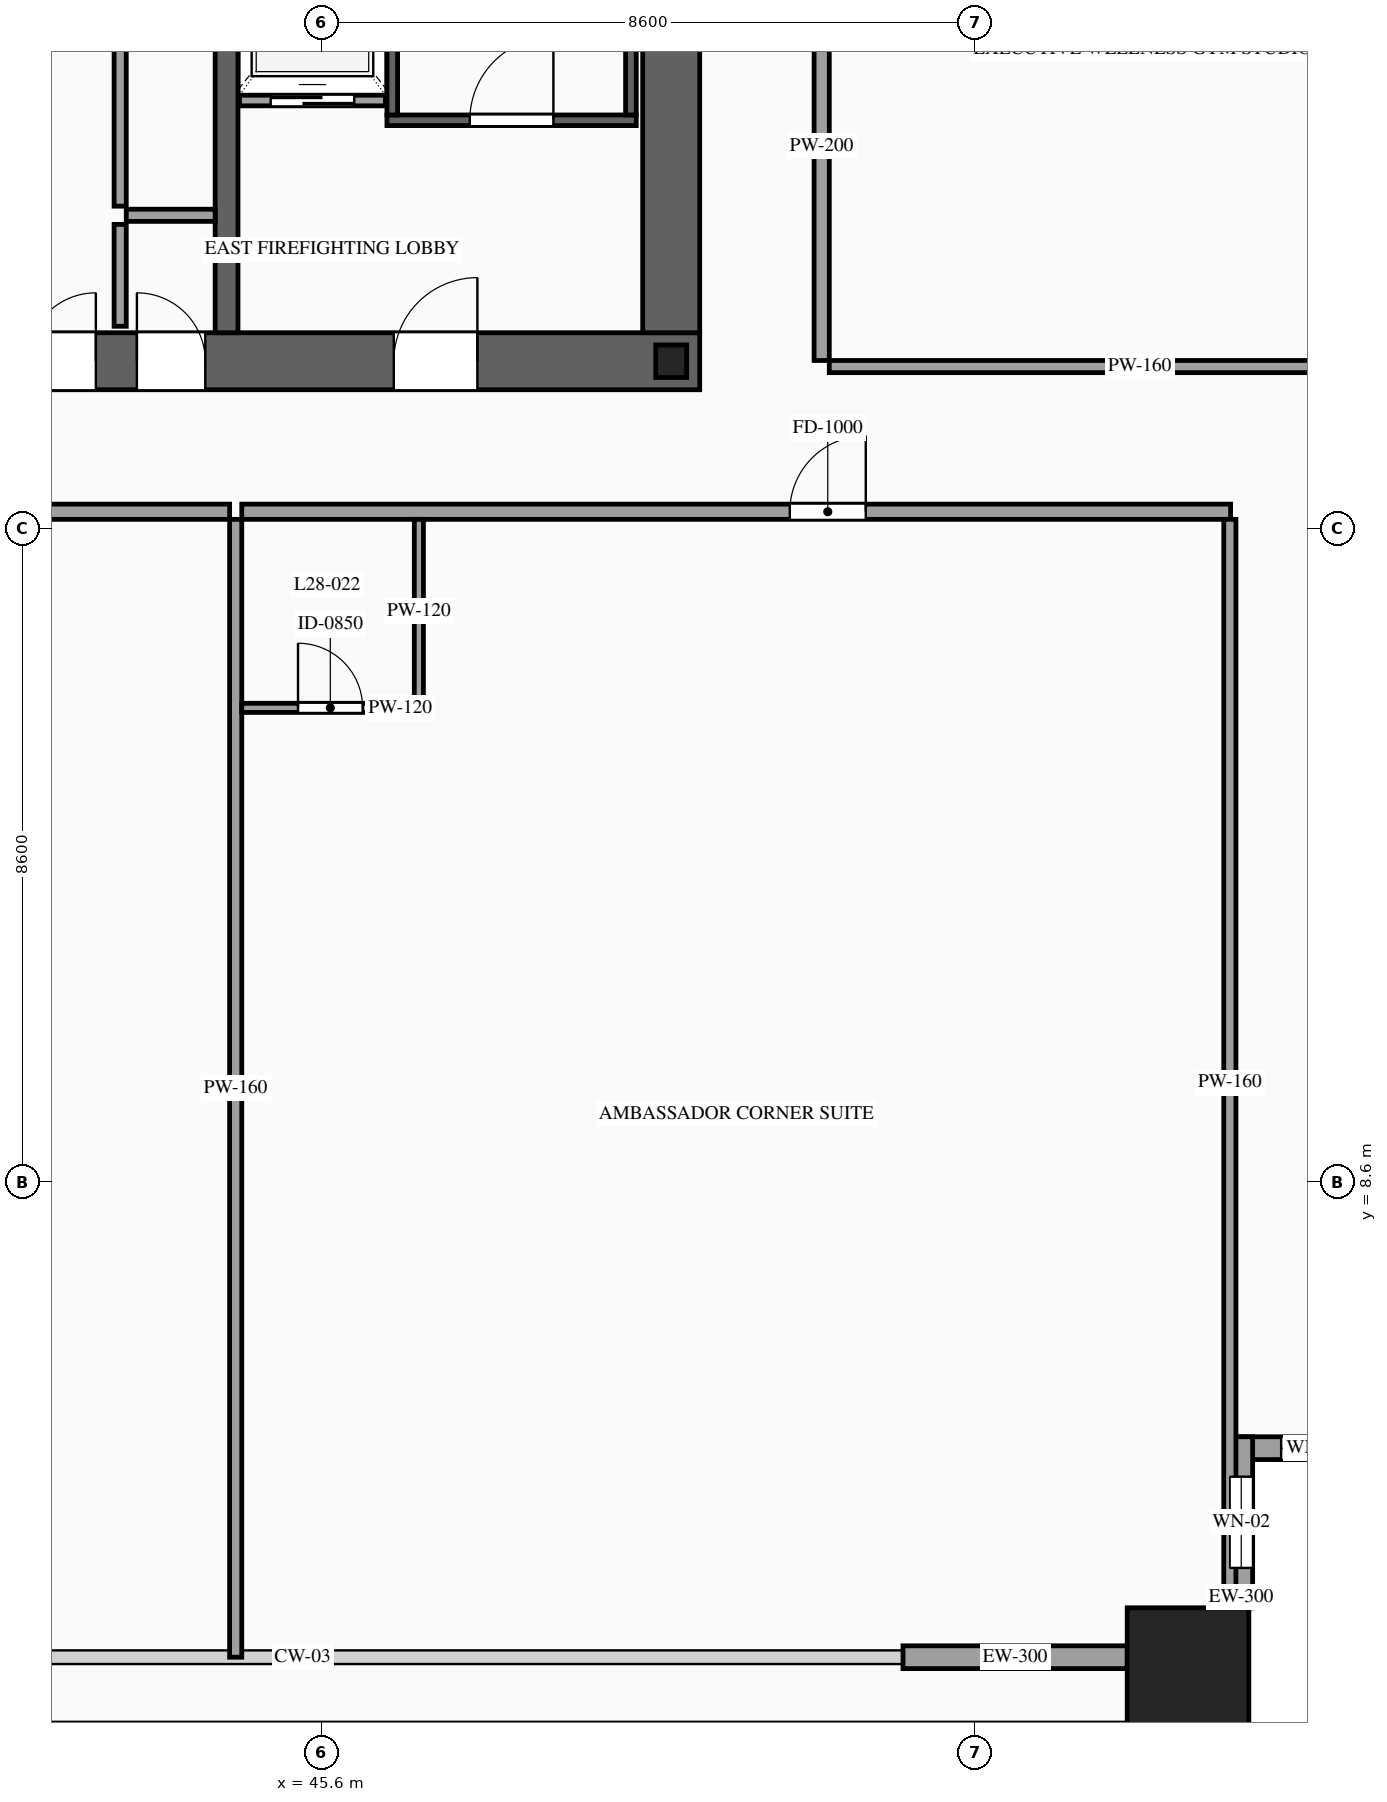
"""IFC4 building model, lengths in metres.
Left out: names, types, materials, properties, quantities, classifications, styles, units other than length and angle.
Written with IfcOpenShell. Run it as: python <this file> out.ifc"""

import sys

from ifc_helpers import new_model, si_unit, direction, frame, frame_2d, origin, origin_2d, place, context, subcontext, project, spatial, rectangle, hollow_rectangle, i_section, extrude, source, transform, mapped, element, fill, save


model = new_model("IFC4")
c1 = context("Model", 3, precision=1e-05, world=origin(), true_north=direction((0.0, 1.0)))
c2 = subcontext(c1, "Body", "Model", "MODEL_VIEW")
j1 = project(units=[si_unit("LENGTHUNIT", "METRE"), si_unit("PLANEANGLEUNIT", "RADIAN")], contexts=[c1])
p1 = place(None, origin())
s1 = spatial("IfcSite", under=j1, at=p1, CompositionType="ELEMENT")
p2 = place(p1, origin())
s2 = spatial("IfcBuilding", under=s1, at=p2, CompositionType="ELEMENT")
p3 = place(p2, frame((0.0, 0.0, 108.2)))
s3 = spatial("IfcBuildingStorey", under=s2, at=p3, CompositionType="ELEMENT", Elevation=108.2)
p4 = place(p3, frame((23.425, 19.4, 0.0), z_axis=(0.0, 0.0, 1.0), x_axis=(1.0, 0.0, 0.0)))
e1 = element("IfcWall", 1, at=p4, inside=s3, PredefinedType="SHEAR", context=c2, shape_type="SweptSolid", body=[
    extrude(rectangle(XDim=27.15, YDim=0.75, at=frame_2d((13.575, 0.0))), origin(), (0.0, 0.0, 1.0), 3.6),
])
p5 = place(p4, frame((2.025, 0.0, 0.0)))
e2 = element("IfcOpeningElement", 2, at=p5, cuts=e1, PredefinedType="OPENING", context=c2, shape_type="SweptSolid", body=[
    extrude(rectangle(XDim=1.1, YDim=2.2, at=frame_2d((0.55, 1.1))), frame((0.0, 0.39, 0.0), z_axis=(0.0, -1.0, 0.0), x_axis=(1.0, 0.0, 0.0)), (0.0, 0.0, 1.0), 0.78),
])
p6 = place(p4, frame((9.925, 0.0, 0.0)))
e3 = element("IfcOpeningElement", 3, at=p6, cuts=e1, PredefinedType="OPENING", context=c2, shape_type="SweptSolid", body=[
    extrude(rectangle(XDim=1.1, YDim=2.2, at=frame_2d((0.55, 1.1))), frame((0.0, 0.39, 0.0), z_axis=(0.0, -1.0, 0.0), x_axis=(1.0, 0.0, 0.0)), (0.0, 0.0, 1.0), 0.78),
])
p7 = place(p4, frame((23.125, 0.0, 0.0)))
e4 = element("IfcOpeningElement", 4, at=p7, cuts=e1, PredefinedType="OPENING", context=c2, shape_type="SweptSolid", body=[
    extrude(rectangle(XDim=1.1, YDim=2.2, at=frame_2d((0.55, 1.1))), frame((0.0, 0.39, 0.0), z_axis=(0.0, -1.0, 0.0), x_axis=(1.0, 0.0, 0.0)), (0.0, 0.0, 1.0), 0.78),
])
p8 = place(p4, frame((19.745, 0.0, 0.0)))
e5 = element("IfcOpeningElement", 5, at=p8, cuts=e1, PredefinedType="OPENING", context=c2, shape_type="SweptSolid", body=[
    extrude(rectangle(XDim=0.9, YDim=2.15, at=frame_2d((0.45, 1.075))), frame((0.0, 0.39, 0.0), z_axis=(0.0, -1.0, 0.0), x_axis=(1.0, 0.0, 0.0)), (0.0, 0.0, 1.0), 0.78),
])
p9 = place(p4, frame((18.305, 0.0, 0.0)))
e6 = element("IfcOpeningElement", 6, at=p9, cuts=e1, PredefinedType="OPENING", context=c2, shape_type="SweptSolid", body=[
    extrude(rectangle(XDim=0.9, YDim=2.15, at=frame_2d((0.45, 1.075))), frame((0.0, 0.39, 0.0), z_axis=(0.0, -1.0, 0.0), x_axis=(1.0, 0.0, 0.0)), (0.0, 0.0, 1.0), 0.78),
])
m1 = source(origin(), c2, "Body", "SweptSolid", [
    extrude(rectangle(XDim=12.05, YDim=0.75, at=frame_2d((6.025, 0.0))), origin(), (0.0, 0.0, 1.0), 3.6),
])
p10 = place(p3, frame((50.2, 19.775, 0.0), z_axis=(0.0, 0.0, 1.0), x_axis=(0.0, 1.0, 0.0)))
e7 = element("IfcWall", 7, at=p10, inside=s3, PredefinedType="SHEAR", context=c2, shape_type="MappedRepresentation", body=[
    mapped(m1, transform((0.0, 0.0, 0.0), scale=1.0)),
])
m2 = source(origin(), c2, "Body", "SweptSolid", [
    extrude(rectangle(XDim=12.05, YDim=0.3, at=frame_2d((6.025, 0.0))), origin(), (0.0, 0.0, 1.0), 3.6),
])
p11 = place(p3, frame((44.35, 19.775, 0.0), z_axis=(0.0, 0.0, 1.0), x_axis=(0.0, 1.0, 0.0)))
e8 = element("IfcWall", 8, at=p11, inside=s3, PredefinedType="SOLIDWALL", context=c2, shape_type="MappedRepresentation", body=[
    mapped(m2, transform((0.0, 0.0, 0.0), scale=1.0)),
])
m3 = source(origin(), c2, "Body", "SweptSolid", [
    extrude(i_section(OverallWidth=0.407, OverallDepth=0.428, WebThickness=0.02, FlangeThickness=0.035, at=origin_2d()), origin(), (0.0, 0.0, 1.0), 3.6),
])
p12 = place(p3, frame((50.2, 19.4, 0.0), z_axis=(0.0, 0.0, 1.0), x_axis=(1.0, 0.0, 0.0)))
e9 = element("IfcColumn", 9, at=p12, inside=s3, PredefinedType="COLUMN", context=c2, shape_type="MappedRepresentation", body=[
    mapped(m3, transform((0.0, 0.0, 0.0), scale=1.0)),
])
m4 = source(origin(), c2, "Body", "SweptSolid", [
    extrude(hollow_rectangle(XDim=1.6, YDim=1.6, WallThickness=0.07, at=origin_2d()), origin(), (0.0, 0.0, 1.0), 3.6),
])
p13 = place(p3, frame((57.0, 2.2, 0.0), z_axis=(0.0, 0.0, 1.0), x_axis=(1.0, 0.0, 0.0)))
e10 = element("IfcColumn", 10, at=p13, inside=s3, PredefinedType="COLUMN", context=c2, shape_type="MappedRepresentation", body=[
    mapped(m4, transform((0.0, 0.0, 0.0), scale=1.0)),
])
p14 = place(p3, frame((57.55, 5.1, 0.0), z_axis=(0.0, 0.0, 1.0), x_axis=(1.0, 0.0, 0.0)))
e11 = element("IfcWall", 11, at=p14, inside=s3, PredefinedType="SOLIDWALL", context=c2, shape_type="SweptSolid", body=[
    extrude(rectangle(XDim=2.25, YDim=0.3, at=frame_2d((1.125, 0.0))), origin(), (0.0, 0.0, 1.0), 3.38),
])
p15 = place(p14, frame((0.675, 0.0, 0.85)))
e12 = element("IfcOpeningElement", 12, at=p15, cuts=e11, PredefinedType="OPENING", context=c2, shape_type="SweptSolid", body=[
    extrude(rectangle(XDim=0.9, YDim=1.5, at=frame_2d((0.45, 0.75))), frame((0.0, 0.165, 0.0), z_axis=(0.0, -1.0, 0.0), x_axis=(1.0, 0.0, 0.0)), (0.0, 0.0, 1.0), 0.33),
])
p16 = place(p3, frame((57.7, 3.0, 0.0), z_axis=(0.0, 0.0, 1.0), x_axis=(0.0, 1.0, 0.0)))
e13 = element("IfcWall", 13, at=p16, inside=s3, PredefinedType="SOLIDWALL", context=c2, shape_type="SweptSolid", body=[
    extrude(rectangle(XDim=2.25, YDim=0.3, at=frame_2d((1.125, 0.0))), origin(), (0.0, 0.0, 1.0), 3.38),
])
p17 = place(p16, frame((0.525, 0.0, 0.85)))
e14 = element("IfcOpeningElement", 14, at=p17, cuts=e13, PredefinedType="OPENING", context=c2, shape_type="SweptSolid", body=[
    extrude(rectangle(XDim=1.2, YDim=2.1, at=frame_2d((0.6, 1.05))), frame((0.0, 0.165, 0.0), z_axis=(0.0, -1.0, 0.0), x_axis=(1.0, 0.0, 0.0)), (0.0, 0.0, 1.0), 0.33),
])
m5 = source(origin(), c2, "Body", "SweptSolid", [
    extrude(rectangle(XDim=2.95, YDim=0.3, at=frame_2d((1.475, 0.0))), origin(), (0.0, 0.0, 1.0), 2.775),
])
p18 = place(p3, frame((53.25, 2.35, 0.0), z_axis=(0.0, 0.0, 1.0), x_axis=(1.0, 0.0, 0.0)))
e15 = element("IfcWall", 15, at=p18, inside=s3, PredefinedType="SOLIDWALL", context=c2, shape_type="MappedRepresentation", body=[
    mapped(m5, transform((0.0, 0.0, 0.0), scale=1.0)),
])
p19 = place(p3, frame((44.52, 22.83, 0.0), z_axis=(0.0, 0.0, 1.0), x_axis=(1.0, 0.0, 0.0)))
e16 = element("IfcWall", 16, at=p19, inside=s3, PredefinedType="SOLIDWALL", context=c2, shape_type="SweptSolid", body=[
    extrude(rectangle(XDim=1.92, YDim=0.14, at=frame_2d((0.96, 0.0))), origin(), (0.0, 0.0, 1.0), 3.38),
])
p20 = place(p19, frame((0.41, 0.0, 0.0)))
e17 = element("IfcOpeningElement", 17, at=p20, cuts=e16, PredefinedType="OPENING", context=c2, shape_type="SweptSolid", body=[
    extrude(rectangle(XDim=1.1, YDim=2.2, at=frame_2d((0.55, 1.1))), frame((0.0, 0.085, 0.0), z_axis=(0.0, -1.0, 0.0), x_axis=(1.0, 0.0, 0.0)), (0.0, 0.0, 1.0), 0.17),
])
p21 = place(p3, frame((46.46, 22.57, 0.0), z_axis=(0.0, 0.0, 1.0), x_axis=(1.0, 0.0, 0.0)))
e18 = element("IfcWall", 18, at=p21, inside=s3, PredefinedType="SOLIDWALL", context=c2, shape_type="SweptSolid", body=[
    extrude(rectangle(XDim=3.28, YDim=0.14, at=frame_2d((1.64, 0.0))), origin(), (0.0, 0.0, 1.0), 3.38),
])
p22 = place(p21, frame((1.09, 0.0, 0.0)))
e19 = element("IfcOpeningElement", 19, at=p22, cuts=e18, PredefinedType="OPENING", context=c2, shape_type="SweptSolid", body=[
    extrude(rectangle(XDim=1.1, YDim=2.2, at=frame_2d((0.55, 1.1))), frame((0.0, 0.085, 0.0), z_axis=(0.0, -1.0, 0.0), x_axis=(1.0, 0.0, 0.0)), (0.0, 0.0, 1.0), 0.17),
])
m6 = source(origin(), c2, "Body", "SweptSolid", [
    extrude(rectangle(XDim=8.94, YDim=0.14, at=frame_2d((4.47, 0.0))), origin(), (0.0, 0.0, 1.0), 3.38),
])
for number, where, z_axis, x_axis in (
    (20, (46.53, 22.64, 0.0), (0.0, 0.0, 1.0), (0.0, 1.0, 0.0)),
    (21, (49.67, 22.64, 0.0), (0.0, 0.0, 1.0), (0.0, 1.0, 0.0)),
):
    element("IfcWall", number, at=place(p3, frame(where, z_axis=z_axis, x_axis=x_axis)), inside=s3, PredefinedType="SOLIDWALL", context=c2, shape_type="MappedRepresentation", body=[
        mapped(m6, transform((0.0, 0.0, 0.0), scale=1.0)),
    ])
m7 = source(origin(), c2, "Body", "SweptSolid", [
    extrude(rectangle(XDim=1.34, YDim=0.16, at=frame_2d((0.67, 0.0))), origin(), (0.0, 0.0, 1.0), 3.38),
])
p23 = place(p3, frame((42.95, 19.86, 0.0), z_axis=(0.0, 0.0, 1.0), x_axis=(0.0, 1.0, 0.0)))
e22 = element("IfcWall", 22, at=p23, inside=s3, PredefinedType="PARTITIONING", context=c2, shape_type="MappedRepresentation", body=[
    mapped(m7, transform((0.0, 0.0, 0.0), scale=1.0)),
])
m8 = source(origin(), c2, "Body", "SweptSolid", [
    extrude(rectangle(XDim=1.17, YDim=0.16, at=frame_2d((0.585, 0.0))), origin(), (0.0, 0.0, 1.0), 3.38),
])
p24 = place(p3, frame((43.03, 21.32, 0.0), z_axis=(0.0, 0.0, 1.0), x_axis=(1.0, 0.0, 0.0)))
e23 = element("IfcWall", 23, at=p24, inside=s3, PredefinedType="PARTITIONING", context=c2, shape_type="MappedRepresentation", body=[
    mapped(m8, transform((0.0, 0.0, 0.0), scale=1.0)),
])
m9 = source(origin(), c2, "Body", "SweptSolid", [
    extrude(rectangle(XDim=10.72, YDim=0.16, at=frame_2d((5.36, 0.0))), origin(), (0.0, 0.0, 1.0), 3.38),
])
p25 = place(p3, frame((42.95, 21.44, 0.0), z_axis=(0.0, 0.0, 1.0), x_axis=(0.0, 1.0, 0.0)))
e24 = element("IfcWall", 24, at=p25, inside=s3, PredefinedType="PARTITIONING", context=c2, shape_type="MappedRepresentation", body=[
    mapped(m9, transform((0.0, 0.0, 0.0), scale=1.0)),
])
p26 = place(p3, frame((29.199, 17.42, 0.0), z_axis=(0.0, 0.0, 1.0), x_axis=(1.0, 0.0, 0.0)))
e25 = element("IfcWall", 25, at=p26, inside=s3, PredefinedType="PARTITIONING", context=c2, shape_type="SweptSolid", body=[
    extrude(rectangle(XDim=15.191, YDim=0.2, at=frame_2d((7.595, 0.0))), origin(), (0.0, 0.0, 1.0), 3.38),
])
p27 = place(p26, frame((8.3, 0.0, 0.0)))
e26 = element("IfcOpeningElement", 26, at=p27, cuts=e25, PredefinedType="OPENING", context=c2, shape_type="SweptSolid", body=[
    extrude(rectangle(XDim=1.0, YDim=2.2, at=frame_2d((0.5, 1.1))), frame((0.0, 0.115, 0.0), z_axis=(0.0, -1.0, 0.0), x_axis=(1.0, 0.0, 0.0)), (0.0, 0.0, 1.0), 0.23),
])
m10 = source(origin(), c2, "Body", "SweptSolid", [
    extrude(rectangle(XDim=14.97, YDim=0.16, at=frame_2d((7.485, 0.0))), origin(), (0.0, 0.0, 1.0), 3.38),
])
p28 = place(p3, frame((44.47, 2.35, 0.0), z_axis=(0.0, 0.0, 1.0), x_axis=(0.0, 1.0, 0.0)))
e27 = element("IfcWall", 27, at=p28, inside=s3, PredefinedType="PARTITIONING", context=c2, shape_type="MappedRepresentation", body=[
    mapped(m10, transform((0.0, 0.0, 0.0), scale=1.0)),
])
p29 = place(p3, frame((44.55, 17.42, 0.0), z_axis=(0.0, 0.0, 1.0), x_axis=(1.0, 0.0, 0.0)))
e28 = element("IfcWall", 28, at=p29, inside=s3, PredefinedType="PARTITIONING", context=c2, shape_type="SweptSolid", body=[
    extrude(rectangle(XDim=13.01, YDim=0.2, at=frame_2d((6.505, 0.0))), origin(), (0.0, 0.0, 1.0), 3.38),
])
p30 = place(p29, frame((7.21, 0.0, 0.0)))
e29 = element("IfcOpeningElement", 29, at=p30, cuts=e28, PredefinedType="OPENING", context=c2, shape_type="SweptSolid", body=[
    extrude(rectangle(XDim=1.0, YDim=2.2, at=frame_2d((0.5, 1.1))), frame((0.0, 0.115, 0.0), z_axis=(0.0, -1.0, 0.0), x_axis=(1.0, 0.0, 0.0)), (0.0, 0.0, 1.0), 0.23),
])
m11 = source(origin(), c2, "Body", "SweptSolid", [
    extrude(rectangle(XDim=14.82, YDim=0.16, at=frame_2d((7.41, 0.0))), origin(), (0.0, 0.0, 1.0), 3.38),
])
p31 = place(p3, frame((57.55, 2.5, 0.0), z_axis=(0.0, 0.0, 1.0), x_axis=(0.0, 1.0, 0.0)))
e30 = element("IfcWall", 30, at=p31, inside=s3, PredefinedType="PARTITIONING", context=c2, shape_type="MappedRepresentation", body=[
    mapped(m11, transform((0.0, 0.0, 0.0), scale=1.0)),
])
p32 = place(p3, frame((44.55, 14.84, 0.0), z_axis=(0.0, 0.0, 1.0), x_axis=(1.0, 0.0, 0.0)))
e31 = element("IfcWall", 31, at=p32, inside=s3, PredefinedType="PARTITIONING", context=c2, shape_type="SweptSolid", body=[
    extrude(rectangle(XDim=2.33, YDim=0.12, at=frame_2d((1.165, 0.0))), origin(), (0.0, 0.0, 1.0), 3.38),
])
p33 = place(p32, frame((0.74, 0.0, 0.0)))
e32 = element("IfcOpeningElement", 32, at=p33, cuts=e31, PredefinedType="OPENING", context=c2, shape_type="SweptSolid", body=[
    extrude(rectangle(XDim=0.85, YDim=2.1, at=frame_2d((0.425, 1.05))), frame((0.0, 0.075, 0.0), z_axis=(0.0, -1.0, 0.0), x_axis=(1.0, 0.0, 0.0)), (0.0, 0.0, 1.0), 0.15),
])
m12 = source(origin(), c2, "Body", "SweptSolid", [
    extrude(rectangle(XDim=2.42, YDim=0.12, at=frame_2d((1.21, 0.0))), origin(), (0.0, 0.0, 1.0), 3.38),
])
p34 = place(p3, frame((46.88, 14.9, 0.0), z_axis=(0.0, 0.0, 1.0), x_axis=(0.0, 1.0, 0.0)))
e33 = element("IfcWall", 33, at=p34, inside=s3, PredefinedType="PARTITIONING", context=c2, shape_type="MappedRepresentation", body=[
    mapped(m12, transform((0.0, 0.0, 0.0), scale=1.0)),
])
p35 = place(p3, frame((52.18, 19.41, 0.0), z_axis=(0.0, 0.0, 1.0), x_axis=(0.0, 1.0, 0.0)))
e34 = element("IfcWall", 34, at=p35, inside=s3, PredefinedType="PARTITIONING", context=c2, shape_type="SweptSolid", body=[
    extrude(rectangle(XDim=12.78, YDim=0.2, at=frame_2d((6.39, 0.0))), origin(), (0.0, 0.0, 1.0), 3.38),
])
p36 = place(p35, frame((5.89, 0.0, 0.0)))
e35 = element("IfcOpeningElement", 35, at=p36, cuts=e34, PredefinedType="OPENING", context=c2, shape_type="SweptSolid", body=[
    extrude(rectangle(XDim=1.0, YDim=2.2, at=frame_2d((0.5, 1.1))), frame((0.0, 0.115, 0.0), z_axis=(0.0, -1.0, 0.0), x_axis=(1.0, 0.0, 0.0)), (0.0, 0.0, 1.0), 0.23),
])
m13 = source(origin(), c2, "Body", "SweptSolid", [
    extrude(rectangle(XDim=8.17, YDim=0.16, at=frame_2d((4.085, 0.0))), origin(), (0.0, 0.0, 1.0), 2.875),
])
p37 = place(p3, frame((52.28, 19.33, 0.0), z_axis=(0.0, 0.0, 1.0), x_axis=(1.0, 0.0, 0.0)))
e36 = element("IfcWall", 36, at=p37, inside=s3, PredefinedType="PARTITIONING", context=c2, shape_type="MappedRepresentation", body=[
    mapped(m13, transform((0.0, 0.0, 0.0), scale=1.0)),
])
m14 = source(origin(), c2, "Body", "SweptSolid", [
    extrude(rectangle(XDim=0.9, YDim=1.5, at=frame_2d((0.45, 0.75))), frame((0.0, 0.03, 0.0), z_axis=(0.0, -1.0, 0.0), x_axis=(1.0, 0.0, 0.0)), (0.0, 0.0, 1.0), 0.06),
])
p38 = place(p15, origin())
e37 = element("IfcWindow", 37, at=p38, inside=s3, PartitioningType="SINGLE_PANEL", PredefinedType="WINDOW", context=c2, shape_type="MappedRepresentation", body=[
    mapped(m14, transform((0.0, 0.0, 0.0), scale=1.0)),
])
fill(e12, e37)
m15 = source(origin(), c2, "Body", "SweptSolid", [
    extrude(rectangle(XDim=1.2, YDim=2.1, at=frame_2d((0.6, 1.05))), frame((0.0, 0.03, 0.0), z_axis=(0.0, -1.0, 0.0), x_axis=(1.0, 0.0, 0.0)), (0.0, 0.0, 1.0), 0.06),
])
p39 = place(p17, origin())
e38 = element("IfcWindow", 38, at=p39, inside=s3, PartitioningType="SINGLE_PANEL", PredefinedType="WINDOW", context=c2, shape_type="MappedRepresentation", body=[
    mapped(m15, transform((0.0, 0.0, 0.0), scale=1.0)),
])
fill(e14, e38)
m16 = source(origin(), c2, "Body", "SweptSolid", [
    extrude(rectangle(XDim=1.1, YDim=2.2, at=frame_2d((0.55, 1.1))), frame((0.0, 0.025, 0.0), z_axis=(0.0, -1.0, 0.0), x_axis=(1.0, 0.0, 0.0)), (0.0, 0.0, 1.0), 0.05),
])
p40 = place(p20, origin())
e39 = element("IfcDoor", 39, at=p40, inside=s3, OperationType="SLIDING_TO_RIGHT", PredefinedType="DOOR", context=c2, shape_type="MappedRepresentation", body=[
    mapped(m16, transform((0.0, 0.0, 0.0), scale=1.0)),
])
fill(e17, e39)
m17 = source(origin(), c2, "Body", "SweptSolid", [
    extrude(rectangle(XDim=1.1, YDim=2.2, at=frame_2d((0.55, 1.1))), frame((0.0, 0.025, 0.0), z_axis=(0.0, -1.0, 0.0), x_axis=(1.0, 0.0, 0.0)), (0.0, 0.0, 1.0), 0.05),
])
p41 = place(p22, origin())
e40 = element("IfcDoor", 40, at=p41, inside=s3, OperationType="SINGLE_SWING_RIGHT", PredefinedType="DOOR", context=c2, shape_type="MappedRepresentation", body=[
    mapped(m17, transform((0.0, 0.0, 0.0), scale=1.0)),
])
fill(e19, e40)
p42 = place(p7, origin())
e41 = element("IfcDoor", 41, at=p42, inside=s3, OperationType="SINGLE_SWING_RIGHT", PredefinedType="DOOR", context=c2, shape_type="MappedRepresentation", body=[
    mapped(m17, transform((0.0, 0.0, 0.0), scale=1.0)),
])
fill(e4, e41)
m18 = source(origin(), c2, "Body", "SweptSolid", [
    extrude(rectangle(XDim=0.9, YDim=2.15, at=frame_2d((0.45, 1.075))), frame((0.0, 0.025, 0.0), z_axis=(0.0, -1.0, 0.0), x_axis=(1.0, 0.0, 0.0)), (0.0, 0.0, 1.0), 0.05),
])
p43 = place(p8, origin())
e42 = element("IfcDoor", 42, at=p43, inside=s3, OperationType="SINGLE_SWING_LEFT", PredefinedType="DOOR", context=c2, shape_type="MappedRepresentation", body=[
    mapped(m18, transform((0.0, 0.0, 0.0), scale=1.0)),
])
fill(e5, e42)
p44 = place(p9, origin())
e43 = element("IfcDoor", 43, at=p44, inside=s3, OperationType="SINGLE_SWING_RIGHT", PredefinedType="DOOR", context=c2, shape_type="MappedRepresentation", body=[
    mapped(m18, transform((0.0, 0.0, 0.0), scale=1.0)),
])
fill(e6, e43)
m19 = source(origin(), c2, "Body", "SweptSolid", [
    extrude(rectangle(XDim=1.0, YDim=2.2, at=frame_2d((0.5, 1.1))), frame((0.0, 0.025, 0.0), z_axis=(0.0, -1.0, 0.0), x_axis=(1.0, 0.0, 0.0)), (0.0, 0.0, 1.0), 0.05),
])
p45 = place(p30, origin())
e44 = element("IfcDoor", 44, at=p45, inside=s3, OperationType="SINGLE_SWING_RIGHT", PredefinedType="DOOR", context=c2, shape_type="MappedRepresentation", body=[
    mapped(m19, transform((0.0, 0.0, 0.0), scale=1.0)),
])
fill(e29, e44)
m20 = source(origin(), c2, "Body", "SweptSolid", [
    extrude(rectangle(XDim=0.85, YDim=2.1, at=frame_2d((0.425, 1.05))), frame((0.0, 0.025, 0.0), z_axis=(0.0, -1.0, 0.0), x_axis=(1.0, 0.0, 0.0)), (0.0, 0.0, 1.0), 0.05),
])
p46 = place(p33, origin())
e45 = element("IfcDoor", 45, at=p46, inside=s3, OperationType="SINGLE_SWING_LEFT", PredefinedType="DOOR", context=c2, shape_type="MappedRepresentation", body=[
    mapped(m20, transform((0.0, 0.0, 0.0), scale=1.0)),
])
fill(e32, e45)
save(model, sys.argv[1])
